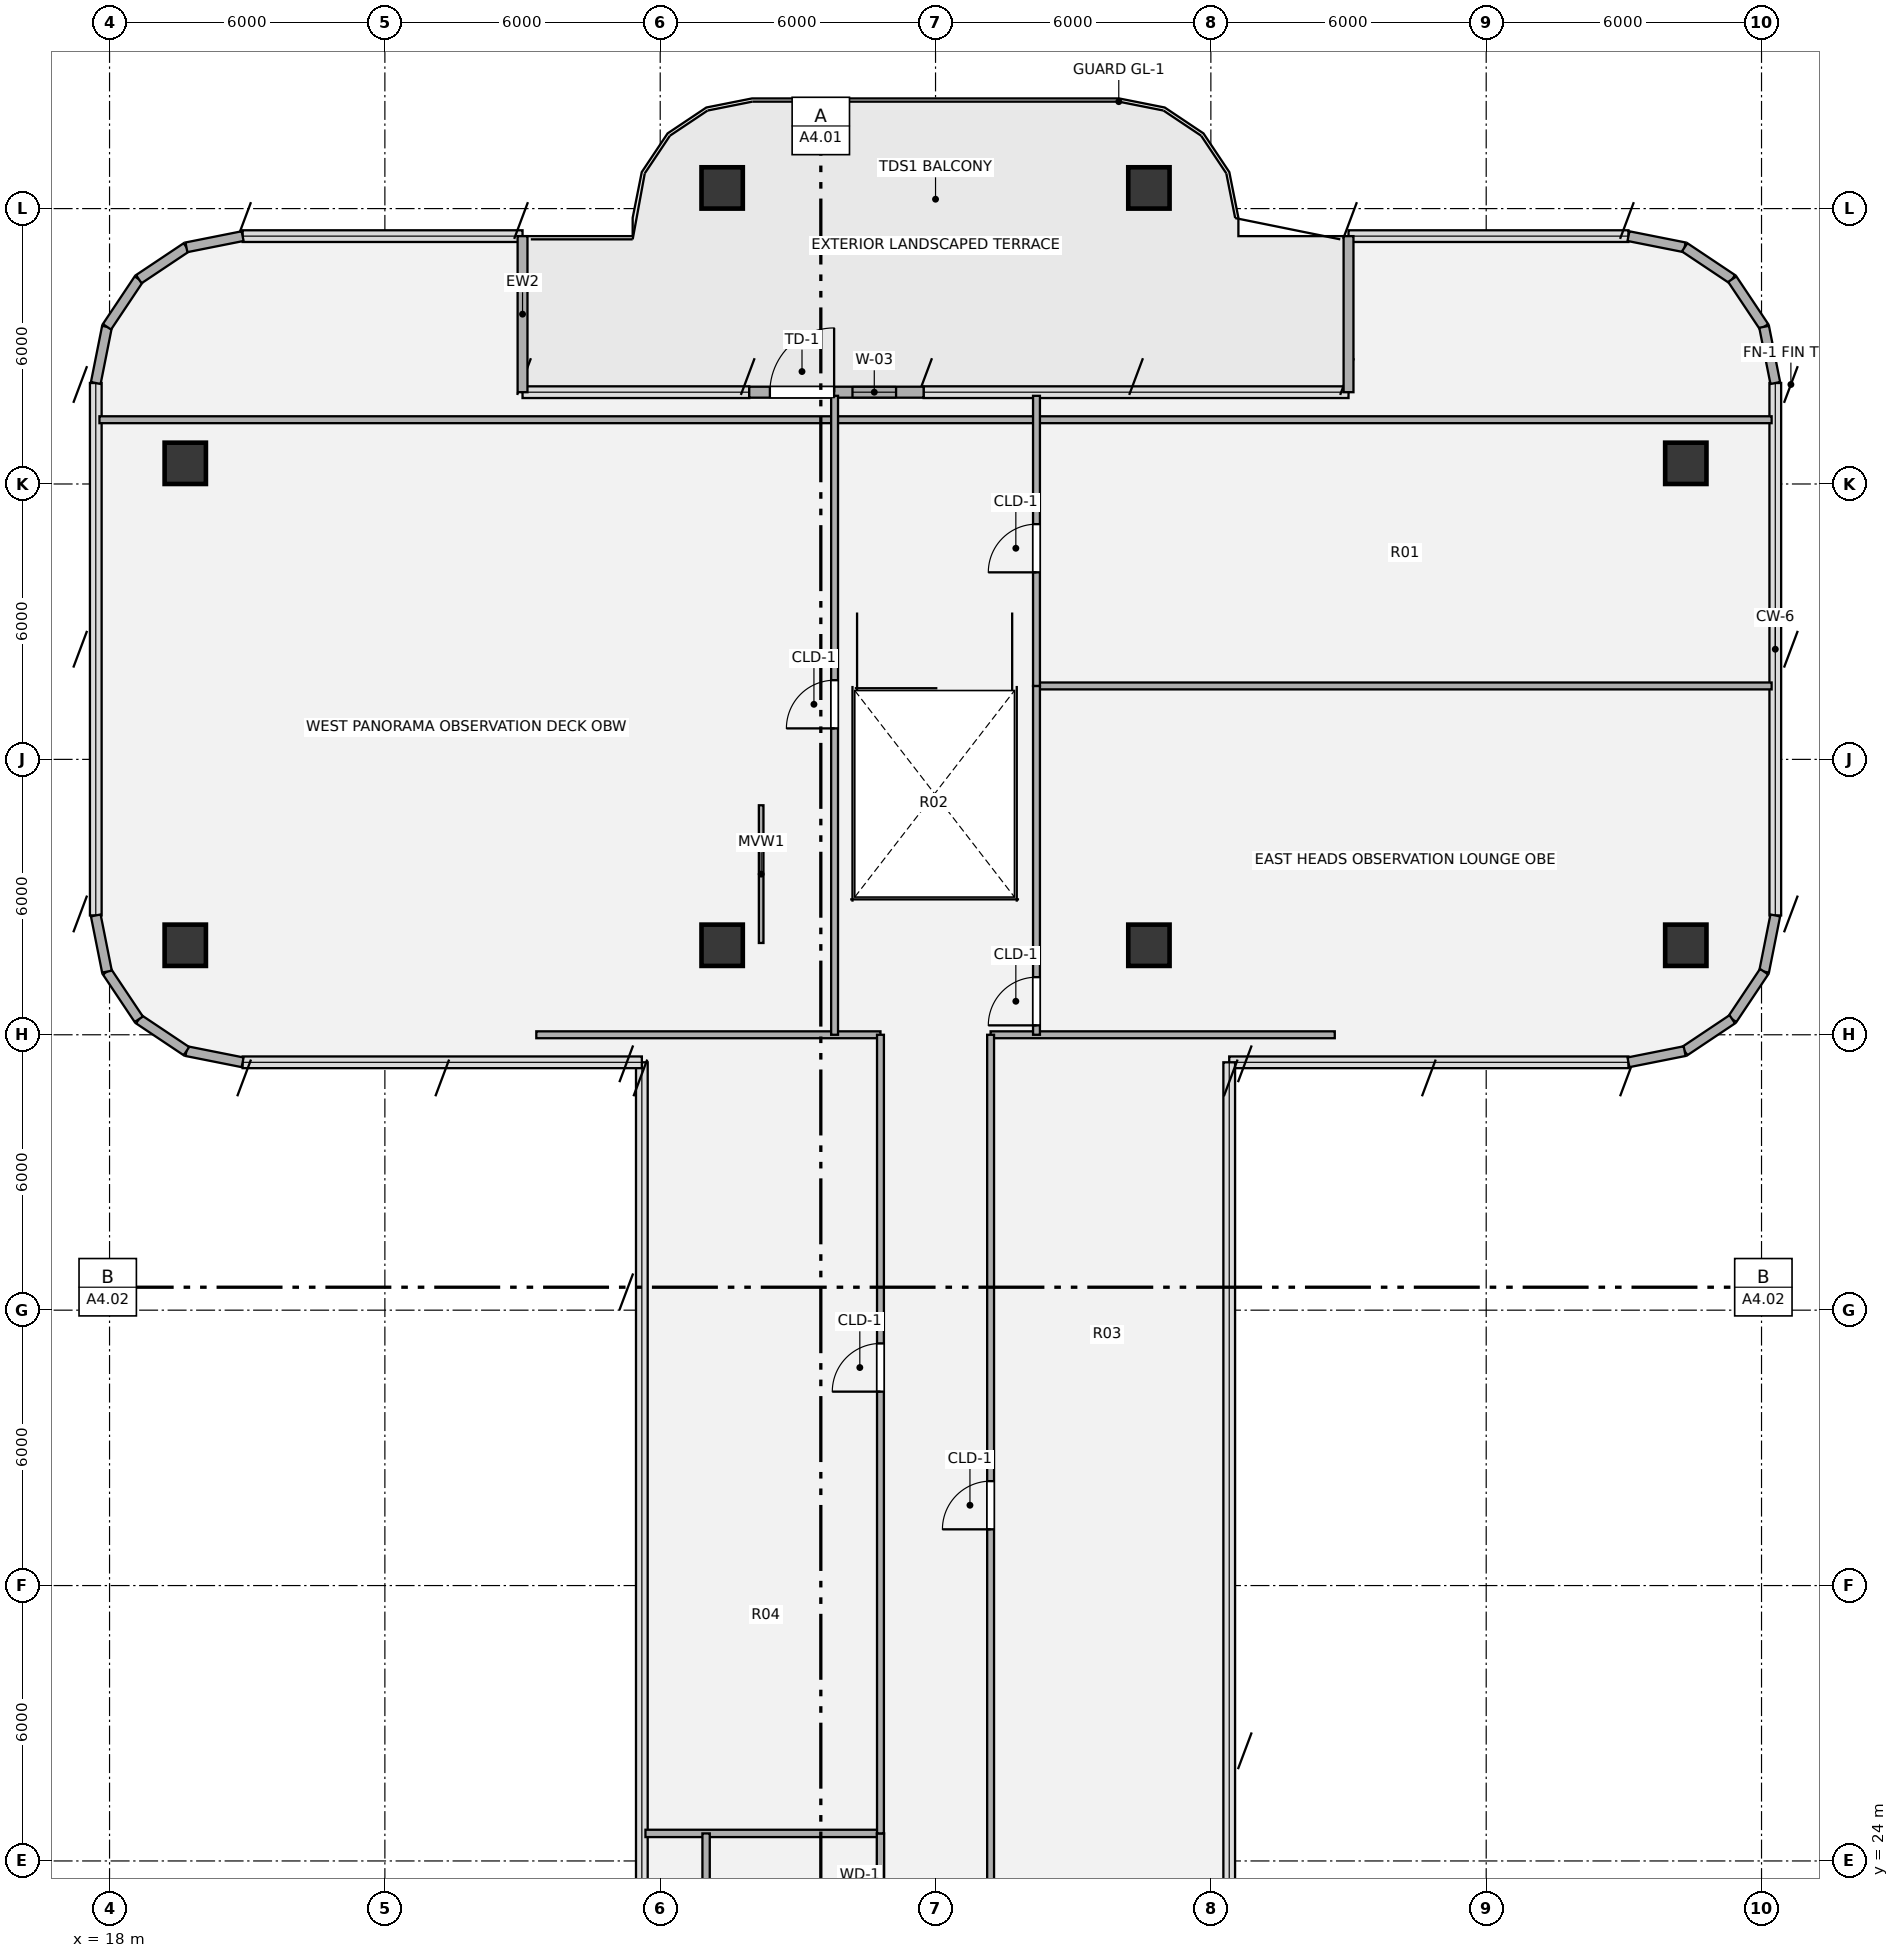
"""IFC4 building model, lengths in metres.
Left out: names, types, materials, properties, quantities, classifications, styles, units other than length and angle.
Written with IfcOpenShell. Run it as: python <this file> out.ifc"""

import sys

from ifc_helpers import new_model, si_unit, direction, frame, frame_2d, origin, origin_2d, place, context, subcontext, project, spatial, rectangle, hollow_circle, extrude, source, transform, mapped, element, fill, save


model = new_model("IFC4")
c1 = context("Model", 3, precision=1e-05, world=origin(), true_north=direction((0.0, 1.0)))
c2 = subcontext(c1, "Body", "Model", "MODEL_VIEW")
j1 = project(units=[si_unit("LENGTHUNIT", "METRE"), si_unit("PLANEANGLEUNIT", "RADIAN")], contexts=[c1])
p1 = place(None, origin())
s1 = spatial("IfcSite", under=j1, at=p1, CompositionType="ELEMENT")
p2 = place(p1, origin())
s2 = spatial("IfcBuilding", under=s1, at=p2, CompositionType="ELEMENT")
p3 = place(p2, frame((0.0, 0.0, 291.06)))
s3 = spatial("IfcBuildingStorey", under=s2, at=p3, CompositionType="ELEMENT", Elevation=291.06)
m1 = source(origin(), c2, "Body", "SweptSolid", [
    extrude(hollow_circle(Radius=0.45, WallThickness=0.032, at=origin_2d()), origin(), (0.0, 0.0, 1.0), 4.86),
])
for number, where, z_axis, x_axis in (
    (1, (19.65, 43.95, 0.0), (0.0, 0.0, 1.0), (1.0, 0.0, 0.0)),
    (2, (19.65, 54.45, 0.0), (0.0, 0.0, 1.0), (1.0, 0.0, 0.0)),
    (3, (52.35, 43.95, 0.0), (0.0, 0.0, 1.0), (1.0, 0.0, 0.0)),
    (4, (52.35, 54.45, 0.0), (0.0, 0.0, 1.0), (1.0, 0.0, 0.0)),
    (5, (31.35, 43.95, 0.0), (0.0, 0.0, 1.0), (1.0, 0.0, 0.0)),
    (6, (40.65, 43.95, 0.0), (0.0, 0.0, 1.0), (1.0, 0.0, 0.0)),
    (7, (31.35, 60.45, 0.0), (0.0, 0.0, 1.0), (1.0, 0.0, 0.0)),
    (8, (40.65, 60.45, 0.0), (0.0, 0.0, 1.0), (1.0, 0.0, 0.0)),
):
    element("IfcColumn", number, at=place(p3, frame(where, z_axis=z_axis, x_axis=x_axis)), inside=s3, PredefinedType="COLUMN", context=c2, shape_type="MappedRepresentation", body=[
        mapped(m1, transform((0.0, 0.0, 0.0), x_axis=(1.0, 0.0, 0.0), y_axis=(0.0, 1.0, 0.0), z_axis=(0.0, 0.0, 1.0), scale=1.0)),
    ])
for number, where, z_axis, x_axis in (
    (9, (51.1, 59.4, 0.0), (0.0, 0.0, 1.0), (0.981, -0.195, 0.0)),
    (10, (52.325, 59.156, 0.0), (0.0, 0.0, 1.0), (0.831, -0.556, 0.0)),
    (11, (53.363, 58.463, 0.0), (0.0, 0.0, 1.0), (0.556, -0.831, 0.0)),
    (12, (54.056, 57.425, 0.0), (0.0, 0.0, 1.0), (0.195, -0.981, 0.0)),
    (13, (54.3, 44.6, 0.0), (0.0, 0.0, 1.0), (-0.195, -0.981, 0.0)),
    (14, (54.056, 43.375, 0.0), (0.0, 0.0, 1.0), (-0.556, -0.831, 0.0)),
    (15, (53.363, 42.337, 0.0), (0.0, 0.0, 1.0), (-0.831, -0.556, 0.0)),
    (16, (52.325, 41.644, 0.0), (0.0, 0.0, 1.0), (-0.981, -0.195, 0.0)),
    (17, (20.9, 41.4, 0.0), (0.0, 0.0, 1.0), (-0.981, 0.195, 0.0)),
    (18, (19.675, 41.644, 0.0), (0.0, 0.0, 1.0), (-0.831, 0.556, 0.0)),
    (19, (18.637, 42.337, 0.0), (0.0, 0.0, 1.0), (-0.556, 0.831, 0.0)),
    (20, (17.944, 43.375, 0.0), (0.0, 0.0, 1.0), (-0.195, 0.981, 0.0)),
    (21, (17.7, 56.2, 0.0), (0.0, 0.0, 1.0), (0.195, 0.981, 0.0)),
    (22, (17.944, 57.425, 0.0), (0.0, 0.0, 1.0), (0.556, 0.831, 0.0)),
    (23, (18.637, 58.463, 0.0), (0.0, 0.0, 1.0), (0.831, 0.556, 0.0)),
    (24, (19.675, 59.156, 0.0), (0.0, 0.0, 1.0), (0.981, 0.195, 0.0)),
):
    element("IfcWall", number, at=place(p3, frame(where, z_axis=z_axis, x_axis=x_axis)), inside=s3, PredefinedType="SOLIDWALL", context=c2, shape_type="SweptSolid", body=[
        extrude(rectangle(XDim=1.249, YDim=0.215, at=frame_2d((0.624, 0.0))), origin(), (0.0, 0.0, 1.0), 4.61),
    ])
p4 = place(p3, frame((27.0, 59.4, 0.0), z_axis=(0.0, 0.0, 1.0), x_axis=(0.0, -1.0, 0.0)))
e25 = element("IfcWall", 25, at=p4, inside=s3, PredefinedType="SOLIDWALL", context=c2, shape_type="SweptSolid", body=[
    extrude(rectangle(XDim=3.4, YDim=0.215, at=frame_2d((1.7, 0.0))), origin(), (0.0, 0.0, 1.0), 4.61),
])
p5 = place(p3, frame((31.94, 56.0, 0.0), z_axis=(0.0, 0.0, 1.0), x_axis=(1.0, 0.0, 0.0)))
e26 = element("IfcWall", 26, at=p5, inside=s3, PredefinedType="SOLIDWALL", context=c2, shape_type="SweptSolid", body=[
    extrude(rectangle(XDim=3.8, YDim=0.24, at=frame_2d((1.9, 0.0))), origin(), (0.0, 0.0, 1.0), 4.61),
])
p6 = place(p5, frame((0.45, 0.0, 0.0)))
e27 = element("IfcOpeningElement", 27, at=p6, cuts=e26, PredefinedType="OPENING", context=c2, shape_type="SweptSolid", body=[
    extrude(rectangle(XDim=1.4, YDim=2.15, at=origin_2d()), frame((0.7, 0.13, 1.075), z_axis=(0.0, -1.0, 0.0), x_axis=(1.0, 0.0, 0.0)), (0.0, 0.0, 1.0), 0.26),
])
p7 = place(p5, frame((2.25, 0.0, 0.85)))
e28 = element("IfcOpeningElement", 28, at=p7, cuts=e26, PredefinedType="OPENING", context=c2, shape_type="SweptSolid", body=[
    extrude(rectangle(XDim=0.95, YDim=1.35, at=origin_2d()), frame((0.475, 0.13, 0.675), z_axis=(0.0, -1.0, 0.0), x_axis=(1.0, 0.0, 0.0)), (0.0, 0.0, 1.0), 0.26),
])
p8 = place(p3, frame((45.0, 56.0, 0.0), z_axis=(0.0, 0.0, 1.0), x_axis=(0.0, 1.0, 0.0)))
e29 = element("IfcWall", 29, at=p8, inside=s3, PredefinedType="SOLIDWALL", context=c2, shape_type="SweptSolid", body=[
    extrude(rectangle(XDim=3.4, YDim=0.215, at=frame_2d((1.7, 0.0))), origin(), (0.0, 0.0, 1.0), 4.61),
])
p9 = place(p3, frame((29.679, 24.6, 0.0), z_axis=(0.0, 0.0, 1.0), x_axis=(1.0, 0.0, 0.0)))
e30 = element("IfcWall", 30, at=p9, inside=s3, PredefinedType="PLUMBINGWALL", context=c2, shape_type="SweptSolid", body=[
    extrude(rectangle(XDim=5.121, YDim=0.16, at=frame_2d((2.561, 0.0))), origin(), (0.0, 0.0, 1.0), 4.58),
])
for number, where, z_axis, x_axis in (
    (31, (27.3, 42.0, 0.0), (0.0, 0.0, 1.0), (1.0, 0.0, 0.0)),
    (32, (37.2, 42.0, 0.0), (0.0, 0.0, 1.0), (1.0, 0.0, 0.0)),
):
    element("IfcWall", number, at=place(p3, frame(where, z_axis=z_axis, x_axis=x_axis)), inside=s3, PredefinedType="PARTITIONING", context=c2, shape_type="SweptSolid", body=[
        extrude(rectangle(XDim=7.5, YDim=0.15, at=frame_2d((3.75, 0.0))), origin(), (0.0, 0.0, 1.0), 4.58),
    ])
p10 = place(p3, frame((38.2, 49.6, 0.0), z_axis=(0.0, 0.0, 1.0), x_axis=(1.0, 0.0, 0.0)))
e33 = element("IfcWall", 33, at=p10, inside=s3, PredefinedType="PARTITIONING", context=c2, shape_type="SweptSolid", body=[
    extrude(rectangle(XDim=16.02, YDim=0.15, at=frame_2d((8.01, 0.0))), origin(), (0.0, 0.0, 1.0), 4.58),
])
p11 = place(p3, frame((17.78, 55.4, 0.0), z_axis=(0.0, 0.0, 1.0), x_axis=(1.0, 0.0, 0.0)))
e34 = element("IfcWall", 34, at=p11, inside=s3, PredefinedType="PARTITIONING", context=c2, shape_type="SweptSolid", body=[
    extrude(rectangle(XDim=36.44, YDim=0.15, at=frame_2d((18.22, 0.0))), origin(), (0.0, 0.0, 1.0), 4.58),
])
p12 = place(p3, frame((31.0, 20.8, 0.0), z_axis=(0.0, 0.0, 1.0), x_axis=(0.0, 1.0, 0.0)))
e35 = element("IfcWall", 35, at=p12, inside=s3, PredefinedType="PLUMBINGWALL", context=c2, shape_type="SweptSolid", body=[
    extrude(rectangle(XDim=3.8, YDim=0.16, at=frame_2d((1.9, 0.0))), origin(), (0.0, 0.0, 1.0), 4.58),
])
p13 = place(p3, frame((33.8, 42.0, 0.0), z_axis=(0.0, 0.0, 1.0), x_axis=(0.0, 1.0, 0.0)))
e36 = element("IfcWall", 36, at=p13, inside=s3, PredefinedType="PARTITIONING", context=c2, shape_type="SweptSolid", body=[
    extrude(rectangle(XDim=13.921, YDim=0.15, at=frame_2d((6.96, 0.0))), origin(), (0.0, 0.0, 1.0), 4.58),
])
p14 = place(p13, frame((6.675, 0.0, 0.0)))
e37 = element("IfcOpeningElement", 37, at=p14, cuts=e36, PredefinedType="OPENING", context=c2, shape_type="SweptSolid", body=[
    extrude(rectangle(XDim=1.05, YDim=2.1, at=origin_2d()), frame((0.525, 0.085, 1.05), z_axis=(0.0, -1.0, 0.0), x_axis=(1.0, 0.0, 0.0)), (0.0, 0.0, 1.0), 0.17),
])
p15 = place(p3, frame((34.8, 20.8, 0.0), z_axis=(0.0, 0.0, 1.0), x_axis=(0.0, 1.0, 0.0)))
e38 = element("IfcWall", 38, at=p15, inside=s3, PredefinedType="PLUMBINGWALL", context=c2, shape_type="SweptSolid", body=[
    extrude(rectangle(XDim=3.8, YDim=0.16, at=frame_2d((1.9, 0.0))), origin(), (0.0, 0.0, 1.0), 4.58),
])
p16 = place(p15, frame((1.47, 0.0, 0.0)))
e39 = element("IfcOpeningElement", 39, at=p16, cuts=e38, PredefinedType="OPENING", context=c2, shape_type="SweptSolid", body=[
    extrude(rectangle(XDim=0.86, YDim=2.1, at=origin_2d()), frame((0.43, 0.09, 1.05), z_axis=(0.0, -1.0, 0.0), x_axis=(1.0, 0.0, 0.0)), (0.0, 0.0, 1.0), 0.18),
])
p17 = place(p3, frame((34.8, 24.6, 0.0), z_axis=(0.0, 0.0, 1.0), x_axis=(0.0, 1.0, 0.0)))
e40 = element("IfcWall", 40, at=p17, inside=s3, PredefinedType="PARTITIONING", context=c2, shape_type="SweptSolid", body=[
    extrude(rectangle(XDim=17.4, YDim=0.15, at=frame_2d((8.7, 0.0))), origin(), (0.0, 0.0, 1.0), 4.58),
])
p18 = place(p17, frame((9.625, 0.0, 0.0)))
e41 = element("IfcOpeningElement", 41, at=p18, cuts=e40, PredefinedType="OPENING", context=c2, shape_type="SweptSolid", body=[
    extrude(rectangle(XDim=1.05, YDim=2.1, at=origin_2d()), frame((0.525, 0.085, 1.05), z_axis=(0.0, -1.0, 0.0), x_axis=(1.0, 0.0, 0.0)), (0.0, 0.0, 1.0), 0.17),
])
p19 = place(p3, frame((37.2, 20.8, 0.0), z_axis=(0.0, 0.0, 1.0), x_axis=(0.0, 1.0, 0.0)))
e42 = element("IfcWall", 42, at=p19, inside=s3, PredefinedType="PARTITIONING", context=c2, shape_type="SweptSolid", body=[
    extrude(rectangle(XDim=21.2, YDim=0.15, at=frame_2d((10.6, 0.0))), origin(), (0.0, 0.0, 1.0), 4.58),
])
p20 = place(p19, frame((10.425, 0.0, 0.0)))
e43 = element("IfcOpeningElement", 43, at=p20, cuts=e42, PredefinedType="OPENING", context=c2, shape_type="SweptSolid", body=[
    extrude(rectangle(XDim=1.05, YDim=2.1, at=origin_2d()), frame((0.525, 0.085, 1.05), z_axis=(0.0, -1.0, 0.0), x_axis=(1.0, 0.0, 0.0)), (0.0, 0.0, 1.0), 0.17),
])
p21 = place(p3, frame((38.2, 42.0, 0.0), z_axis=(0.0, 0.0, 1.0), x_axis=(0.0, 1.0, 0.0)))
e44 = element("IfcWall", 44, at=p21, inside=s3, PredefinedType="PARTITIONING", context=c2, shape_type="SweptSolid", body=[
    extrude(rectangle(XDim=7.6, YDim=0.15, at=frame_2d((3.8, 0.0))), origin(), (0.0, 0.0, 1.0), 4.58),
])
p22 = place(p21, frame((0.205, 0.0, 0.0)))
e45 = element("IfcOpeningElement", 45, at=p22, cuts=e44, PredefinedType="OPENING", context=c2, shape_type="SweptSolid", body=[
    extrude(rectangle(XDim=1.05, YDim=2.1, at=origin_2d()), frame((0.525, 0.085, 1.05), z_axis=(0.0, -1.0, 0.0), x_axis=(1.0, 0.0, 0.0)), (0.0, 0.0, 1.0), 0.17),
])
p23 = place(p3, frame((38.2, 49.6, 0.0), z_axis=(0.0, 0.0, 1.0), x_axis=(0.0, 1.0, 0.0)))
e46 = element("IfcWall", 46, at=p23, inside=s3, PredefinedType="PARTITIONING", context=c2, shape_type="SweptSolid", body=[
    extrude(rectangle(XDim=6.321, YDim=0.15, at=frame_2d((3.16, 0.0))), origin(), (0.0, 0.0, 1.0), 4.58),
])
p24 = place(p23, frame((2.475, 0.0, 0.0)))
e47 = element("IfcOpeningElement", 47, at=p24, cuts=e46, PredefinedType="OPENING", context=c2, shape_type="SweptSolid", body=[
    extrude(rectangle(XDim=1.05, YDim=2.1, at=origin_2d()), frame((0.525, 0.085, 1.05), z_axis=(0.0, -1.0, 0.0), x_axis=(1.0, 0.0, 0.0)), (0.0, 0.0, 1.0), 0.17),
])
p25 = place(p3, frame((32.2, 44.0, 0.0), z_axis=(0.0, 0.0, 1.0), x_axis=(0.0, 1.0, 0.0)))
e48 = element("IfcWall", 48, at=p25, inside=s3, PredefinedType="MOVABLE", context=c2, shape_type="SweptSolid", body=[
    extrude(rectangle(XDim=3.0, YDim=0.1, at=frame_2d((1.5, 0.0))), origin(), (0.0, 0.0, 1.0), 2.85),
])
m2 = source(origin(), c2, "Body", "SweptSolid", [
    extrude(rectangle(XDim=1.4, YDim=2.15, at=origin_2d()), frame((0.7, 0.025, 1.075), z_axis=(0.0, -1.0, 0.0), x_axis=(1.0, 0.0, 0.0)), (0.0, 0.0, 1.0), 0.05),
])
p26 = place(p6, origin())
e49 = element("IfcDoor", 49, at=p26, inside=s3, OperationType="SINGLE_SWING_RIGHT", PredefinedType="DOOR", context=c2, shape_type="MappedRepresentation", body=[
    mapped(m2, transform((0.0, 0.0, 0.0), x_axis=(1.0, 0.0, 0.0), y_axis=(0.0, 1.0, 0.0), z_axis=(0.0, 0.0, 1.0), scale=1.0)),
])
fill(e27, e49)
m3 = source(origin(), c2, "Body", "SweptSolid", [
    extrude(rectangle(XDim=0.95, YDim=1.35, at=origin_2d()), frame((0.475, 0.03, 0.675), z_axis=(0.0, -1.0, 0.0), x_axis=(1.0, 0.0, 0.0)), (0.0, 0.0, 1.0), 0.06),
])
p27 = place(p7, origin())
e50 = element("IfcWindow", 50, at=p27, inside=s3, PartitioningType="SINGLE_PANEL", PredefinedType="WINDOW", context=c2, shape_type="MappedRepresentation", body=[
    mapped(m3, transform((0.0, 0.0, 0.0), x_axis=(1.0, 0.0, 0.0), y_axis=(0.0, 1.0, 0.0), z_axis=(0.0, 0.0, 1.0), scale=1.0)),
])
fill(e28, e50)
m4 = source(origin(), c2, "Body", "SweptSolid", [
    extrude(rectangle(XDim=1.05, YDim=2.1, at=origin_2d()), frame((0.525, 0.025, 1.05), z_axis=(0.0, -1.0, 0.0), x_axis=(1.0, 0.0, 0.0)), (0.0, 0.0, 1.0), 0.05),
])
p28 = place(p14, origin())
e51 = element("IfcDoor", 51, at=p28, inside=s3, OperationType="SINGLE_SWING_LEFT", PredefinedType="DOOR", context=c2, shape_type="MappedRepresentation", body=[
    mapped(m4, transform((0.0, 0.0, 0.0), x_axis=(1.0, 0.0, 0.0), y_axis=(0.0, 1.0, 0.0), z_axis=(0.0, 0.0, 1.0), scale=1.0)),
])
fill(e37, e51)
p29 = place(p18, origin())
e52 = element("IfcDoor", 52, at=p29, inside=s3, OperationType="SINGLE_SWING_LEFT", PredefinedType="DOOR", context=c2, shape_type="MappedRepresentation", body=[
    mapped(m4, transform((0.0, 0.0, 0.0), x_axis=(1.0, 0.0, 0.0), y_axis=(0.0, 1.0, 0.0), z_axis=(0.0, 0.0, 1.0), scale=1.0)),
])
fill(e41, e52)
p30 = place(p20, origin())
e53 = element("IfcDoor", 53, at=p30, inside=s3, OperationType="SINGLE_SWING_LEFT", PredefinedType="DOOR", context=c2, shape_type="MappedRepresentation", body=[
    mapped(m4, transform((0.0, 0.0, 0.0), x_axis=(1.0, 0.0, 0.0), y_axis=(0.0, 1.0, 0.0), z_axis=(0.0, 0.0, 1.0), scale=1.0)),
])
fill(e43, e53)
p31 = place(p22, origin())
e54 = element("IfcDoor", 54, at=p31, inside=s3, OperationType="SINGLE_SWING_LEFT", PredefinedType="DOOR", context=c2, shape_type="MappedRepresentation", body=[
    mapped(m4, transform((0.0, 0.0, 0.0), x_axis=(1.0, 0.0, 0.0), y_axis=(0.0, 1.0, 0.0), z_axis=(0.0, 0.0, 1.0), scale=1.0)),
])
fill(e45, e54)
p32 = place(p24, origin())
e55 = element("IfcDoor", 55, at=p32, inside=s3, OperationType="SINGLE_SWING_LEFT", PredefinedType="DOOR", context=c2, shape_type="MappedRepresentation", body=[
    mapped(m4, transform((0.0, 0.0, 0.0), x_axis=(1.0, 0.0, 0.0), y_axis=(0.0, 1.0, 0.0), z_axis=(0.0, 0.0, 1.0), scale=1.0)),
])
fill(e47, e55)
save(model, sys.argv[1])
